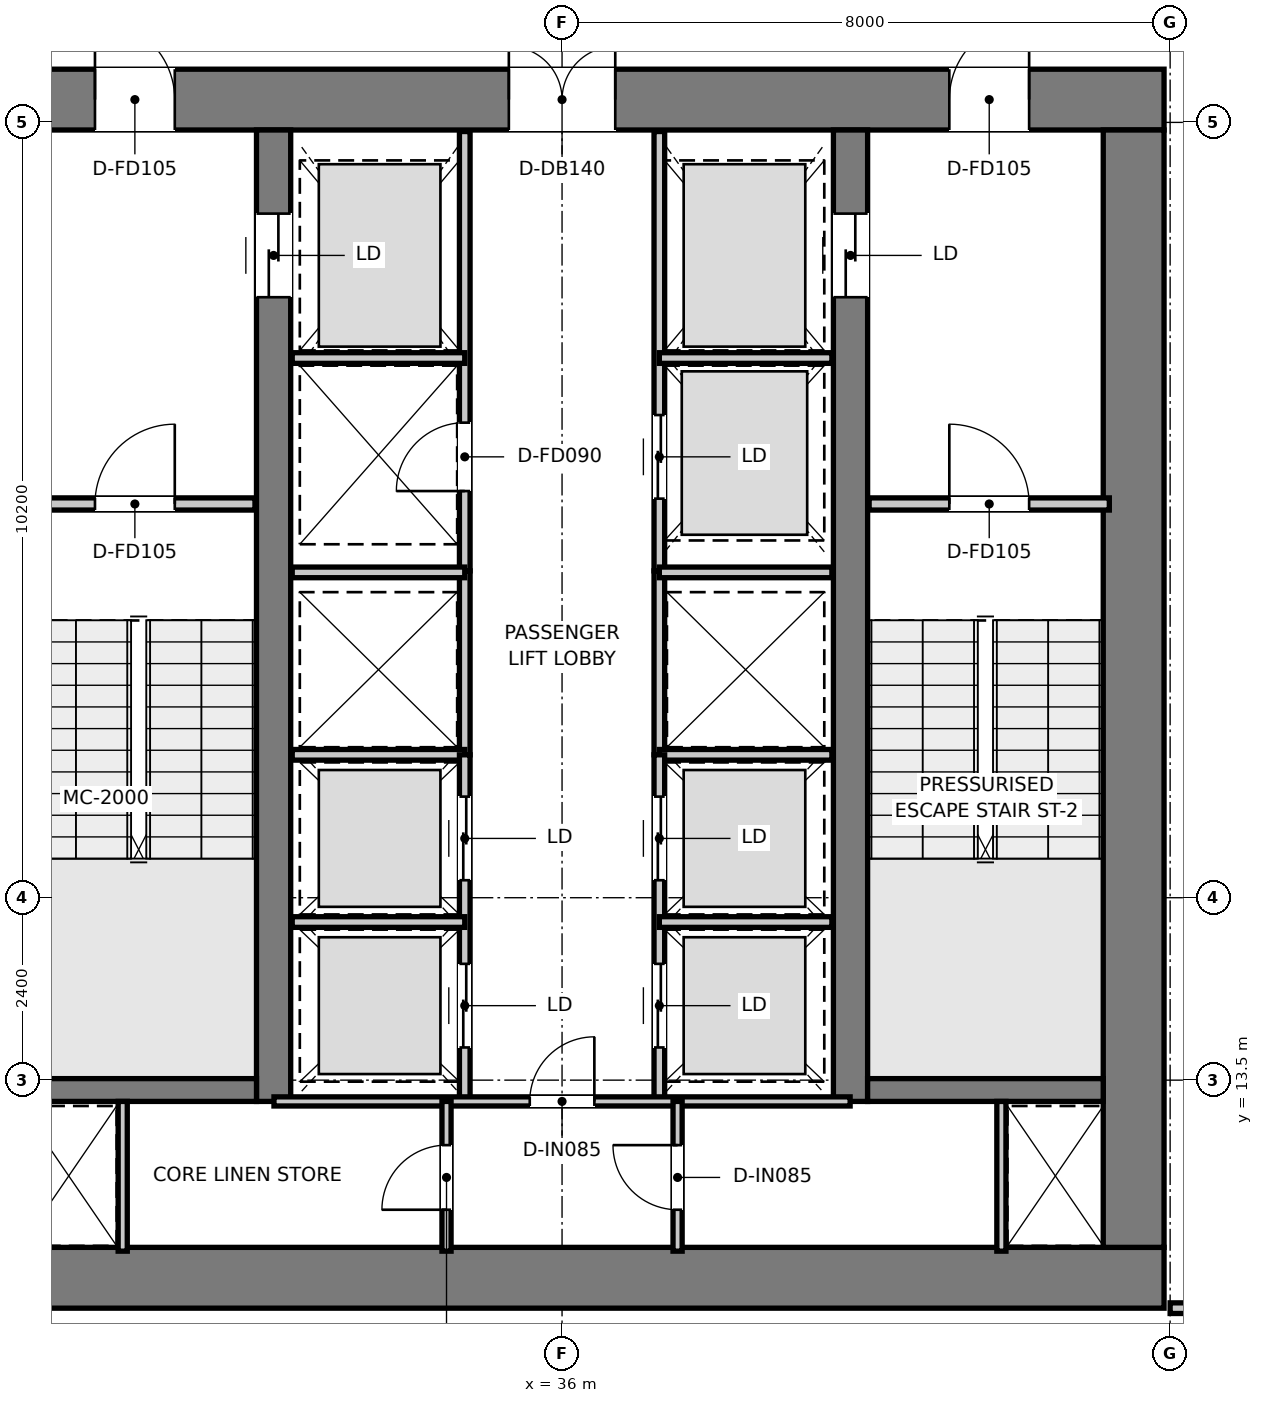
"""IFC4 building model, lengths in metres.
Left out: names, types, materials, properties, quantities, classifications, styles, units other than length and angle.
Written with IfcOpenShell. Run it as: python <this file> out.ifc"""

import sys

from ifc_helpers import new_model, si_unit, direction, frame, frame_2d, origin, place, context, subcontext, project, spatial, rectangle, extrude, element, fill, save


model = new_model("IFC4")
c1 = context("Model", 3, precision=1e-05, world=origin(), true_north=direction((0.0, 1.0)))
c2 = subcontext(c1, "Body", "Model", "MODEL_VIEW")
j1 = project(units=[si_unit("LENGTHUNIT", "METRE"), si_unit("PLANEANGLEUNIT", "RADIAN")], contexts=[c1])
p1 = place(None, origin())
s1 = spatial("IfcSite", under=j1, at=p1, CompositionType="ELEMENT")
p2 = place(p1, origin())
s2 = spatial("IfcBuilding", under=s1, at=p2, CompositionType="ELEMENT")
p3 = place(p2, frame((0.0, 0.0, 137.45)))
s3 = spatial("IfcBuildingStorey", under=s2, at=p3, CompositionType="ELEMENT", Elevation=137.45)
p4 = place(p3, frame((28.08, 10.9, 0.0), z_axis=(0.0, 0.0, 1.0), x_axis=(1.0, 0.0, 0.0)))
e1 = element("IfcWall", 1, at=p4, inside=s3, PredefinedType="SHEAR", context=c2, shape_type="SweptSolid", body=[
    extrude(rectangle(XDim=15.84, YDim=0.8, at=frame_2d((7.92, 0.0))), origin(), (0.0, 0.0, 1.0), 3.95),
])
p5 = place(p3, frame((28.08, 26.4, 0.0), z_axis=(0.0, 0.0, 1.0), x_axis=(1.0, 0.0, 0.0)))
e2 = element("IfcWall", 2, at=p5, inside=s3, PredefinedType="SHEAR", context=c2, shape_type="SweptSolid", body=[
    extrude(rectangle(XDim=15.84, YDim=0.8, at=frame_2d((7.92, 0.0))), origin(), (0.0, 0.0, 1.0), 3.95),
])
p6 = place(p5, frame((7.22, 0.0, 0.0)))
e3 = element("IfcOpeningElement", 3, at=p6, cuts=e2, PredefinedType="OPENING", context=c2, shape_type="SweptSolid", body=[
    extrude(rectangle(XDim=1.4, YDim=2.2, at=frame_2d((0.7, 1.1))), frame((0.0, 0.41, 0.0), z_axis=(0.0, -1.0, 0.0), x_axis=(1.0, 0.0, 0.0)), (0.0, 0.0, 1.0), 0.82),
])
p7 = place(p5, frame((1.775, 0.0, 0.0)))
e4 = element("IfcOpeningElement", 4, at=p7, cuts=e2, PredefinedType="OPENING", context=c2, shape_type="SweptSolid", body=[
    extrude(rectangle(XDim=1.05, YDim=2.1, at=frame_2d((0.525, 1.05))), frame((0.0, 0.41, 0.0), z_axis=(0.0, -1.0, 0.0), x_axis=(1.0, 0.0, 0.0)), (0.0, 0.0, 1.0), 0.82),
])
p8 = place(p5, frame((13.015, 0.0, 0.0)))
e5 = element("IfcOpeningElement", 5, at=p8, cuts=e2, PredefinedType="OPENING", context=c2, shape_type="SweptSolid", body=[
    extrude(rectangle(XDim=1.05, YDim=2.1, at=frame_2d((0.525, 1.05))), frame((0.0, 0.41, 0.0), z_axis=(0.0, -1.0, 0.0), x_axis=(1.0, 0.0, 0.0)), (0.0, 0.0, 1.0), 0.82),
])
p9 = place(p3, frame((43.52, 11.3, 0.0), z_axis=(0.0, 0.0, 1.0), x_axis=(0.0, 1.0, 0.0)))
e6 = element("IfcWall", 6, at=p9, inside=s3, PredefinedType="SHEAR", context=c2, shape_type="SweptSolid", body=[
    extrude(rectangle(XDim=14.7, YDim=0.8, at=frame_2d((7.35, 0.0))), origin(), (0.0, 0.0, 1.0), 3.95),
])
p10 = place(p3, frame((32.205, 13.22, 0.0), z_axis=(0.0, 0.0, 1.0), x_axis=(0.0, 1.0, 0.0)))
e7 = element("IfcWall", 7, at=p10, inside=s3, PredefinedType="SHEAR", context=c2, shape_type="SweptSolid", body=[
    extrude(rectangle(XDim=12.78, YDim=0.45, at=frame_2d((6.39, 0.0))), origin(), (0.0, 0.0, 1.0), 3.95),
])
p11 = place(p10, frame((10.58, 0.0, 0.0)))
e8 = element("IfcOpeningElement", 8, at=p11, cuts=e7, PredefinedType="OPENING", context=c2, shape_type="SweptSolid", body=[
    extrude(rectangle(XDim=1.1, YDim=2.15, at=frame_2d((0.55, 1.075))), frame((0.0, 0.235, 0.0), z_axis=(0.0, -1.0, 0.0), x_axis=(1.0, 0.0, 0.0)), (0.0, 0.0, 1.0), 0.47),
])
p12 = place(p3, frame((39.795, 13.22, 0.0), z_axis=(0.0, 0.0, 1.0), x_axis=(0.0, 1.0, 0.0)))
e9 = element("IfcWall", 9, at=p12, inside=s3, PredefinedType="SHEAR", context=c2, shape_type="SweptSolid", body=[
    extrude(rectangle(XDim=12.78, YDim=0.45, at=frame_2d((6.39, 0.0))), origin(), (0.0, 0.0, 1.0), 3.95),
])
p13 = place(p12, frame((10.58, 0.0, 0.0)))
e10 = element("IfcOpeningElement", 10, at=p13, cuts=e9, PredefinedType="OPENING", context=c2, shape_type="SweptSolid", body=[
    extrude(rectangle(XDim=1.1, YDim=2.15, at=frame_2d((0.55, 1.075))), frame((0.0, 0.235, 0.0), z_axis=(0.0, -1.0, 0.0), x_axis=(1.0, 0.0, 0.0)), (0.0, 0.0, 1.0), 0.47),
])
for number, where, z_axis, x_axis in (
    (11, (28.88, 13.37, 0.0), (0.0, 0.0, 1.0), (1.0, 0.0, 0.0)),
    (12, (40.02, 13.37, 0.0), (0.0, 0.0, 1.0), (1.0, 0.0, 0.0)),
):
    element("IfcWall", number, at=place(p3, frame(where, z_axis=z_axis, x_axis=x_axis)), inside=s3, PredefinedType="SHEAR", context=c2, shape_type="SweptSolid", body=[
        extrude(rectangle(XDim=3.1, YDim=0.3, at=frame_2d((1.55, 0.0))), origin(), (0.0, 0.0, 1.0), 3.95),
    ])
p14 = place(p3, frame((28.8, 21.08, 0.0), z_axis=(0.0, 0.0, 1.0), x_axis=(1.0, 0.0, 0.0)))
e13 = element("IfcWall", 13, at=p14, inside=s3, PredefinedType="PARTITIONING", context=c2, shape_type="SweptSolid", body=[
    extrude(rectangle(XDim=3.16, YDim=0.16, at=frame_2d((1.58, 0.0))), origin(), (0.0, 0.0, 1.0), 3.6),
])
p15 = place(p14, frame((1.055, 0.0, 0.0)))
e14 = element("IfcOpeningElement", 14, at=p15, cuts=e13, PredefinedType="OPENING", context=c2, shape_type="SweptSolid", body=[
    extrude(rectangle(XDim=1.05, YDim=2.1, at=frame_2d((0.525, 1.05))), frame((0.0, 0.09, 0.0), z_axis=(0.0, -1.0, 0.0), x_axis=(1.0, 0.0, 0.0)), (0.0, 0.0, 1.0), 0.18),
])
p16 = place(p3, frame((40.04, 21.08, 0.0), z_axis=(0.0, 0.0, 1.0), x_axis=(1.0, 0.0, 0.0)))
e15 = element("IfcWall", 15, at=p16, inside=s3, PredefinedType="PARTITIONING", context=c2, shape_type="SweptSolid", body=[
    extrude(rectangle(XDim=3.16, YDim=0.16, at=frame_2d((1.58, 0.0))), origin(), (0.0, 0.0, 1.0), 3.6),
])
p17 = place(p16, frame((1.055, 0.0, 0.0)))
e16 = element("IfcOpeningElement", 16, at=p17, cuts=e15, PredefinedType="OPENING", context=c2, shape_type="SweptSolid", body=[
    extrude(rectangle(XDim=1.05, YDim=2.1, at=frame_2d((0.525, 1.05))), frame((0.0, 0.09, 0.0), z_axis=(0.0, -1.0, 0.0), x_axis=(1.0, 0.0, 0.0)), (0.0, 0.0, 1.0), 0.18),
])
p18 = place(p3, frame((34.72, 20.2, 0.0), z_axis=(0.0, 0.0, 1.0), x_axis=(0.0, 1.0, 0.0)))
e17 = element("IfcWall", 17, at=p18, inside=s3, PredefinedType="PARTITIONING", context=c2, shape_type="SweptSolid", body=[
    extrude(rectangle(XDim=5.78, YDim=0.14, at=frame_2d((2.89, 0.0))), origin(), (0.0, 0.0, 1.0), 2.6),
])
p19 = place(p18, frame((1.05, 0.0, 0.0)))
e18 = element("IfcOpeningElement", 18, at=p19, cuts=e17, PredefinedType="OPENING", context=c2, shape_type="SweptSolid", body=[
    extrude(rectangle(XDim=0.9, YDim=2.1, at=frame_2d((0.45, 1.05))), frame((0.0, 0.08, 0.0), z_axis=(0.0, -1.0, 0.0), x_axis=(1.0, 0.0, 0.0)), (0.0, 0.0, 1.0), 0.16),
])
p20 = place(p3, frame((37.28, 20.2, 0.0), z_axis=(0.0, 0.0, 1.0), x_axis=(0.0, 1.0, 0.0)))
e19 = element("IfcWall", 19, at=p20, inside=s3, PredefinedType="PARTITIONING", context=c2, shape_type="SweptSolid", body=[
    extrude(rectangle(XDim=5.78, YDim=0.14, at=frame_2d((2.89, 0.0))), origin(), (0.0, 0.0, 1.0), 2.6),
])
p21 = place(p20, frame((0.95, 0.0, 0.0)))
e20 = element("IfcOpeningElement", 20, at=p21, cuts=e19, PredefinedType="OPENING", context=c2, shape_type="SweptSolid", body=[
    extrude(rectangle(XDim=1.1, YDim=2.15, at=frame_2d((0.55, 1.075))), frame((0.0, 0.08, 0.0), z_axis=(0.0, -1.0, 0.0), x_axis=(1.0, 0.0, 0.0)), (0.0, 0.0, 1.0), 0.16),
])
for number, where, z_axis, x_axis in (
    (21, (32.45, 23.0, 0.0), (0.0, 0.0, 1.0), (1.0, 0.0, 0.0)),
    (22, (37.28, 23.0, 0.0), (0.0, 0.0, 1.0), (1.0, 0.0, 0.0)),
):
    element("IfcWall", number, at=place(p3, frame(where, z_axis=z_axis, x_axis=x_axis)), inside=s3, PredefinedType="PARTITIONING", context=c2, shape_type="SweptSolid", body=[
        extrude(rectangle(XDim=2.27, YDim=0.14, at=frame_2d((1.135, 0.0))), origin(), (0.0, 0.0, 1.0), 2.6),
    ])
for number, where, z_axis, x_axis in (
    (23, (34.72, 17.78, 0.0), (0.0, 0.0, 1.0), (0.0, 1.0, 0.0)),
    (24, (37.28, 17.78, 0.0), (0.0, 0.0, 1.0), (0.0, 1.0, 0.0)),
):
    element("IfcWall", number, at=place(p3, frame(where, z_axis=z_axis, x_axis=x_axis)), inside=s3, PredefinedType="PARTITIONING", context=c2, shape_type="SweptSolid", body=[
        extrude(rectangle(XDim=2.42, YDim=0.14, at=frame_2d((1.21, 0.0))), origin(), (0.0, 0.0, 1.0), 3.6),
    ])
for number, where, z_axis, x_axis in (
    (25, (32.45, 17.78, 0.0), (0.0, 0.0, 1.0), (1.0, 0.0, 0.0)),
    (26, (32.45, 20.18, 0.0), (0.0, 0.0, 1.0), (1.0, 0.0, 0.0)),
    (27, (37.28, 17.78, 0.0), (0.0, 0.0, 1.0), (1.0, 0.0, 0.0)),
    (28, (37.28, 20.18, 0.0), (0.0, 0.0, 1.0), (1.0, 0.0, 0.0)),
):
    element("IfcWall", number, at=place(p3, frame(where, z_axis=z_axis, x_axis=x_axis)), inside=s3, PredefinedType="PARTITIONING", context=c2, shape_type="SweptSolid", body=[
        extrude(rectangle(XDim=2.27, YDim=0.14, at=frame_2d((1.135, 0.0))), origin(), (0.0, 0.0, 1.0), 3.6),
    ])
p22 = place(p3, frame((34.72, 13.22, 0.0), z_axis=(0.0, 0.0, 1.0), x_axis=(0.0, 1.0, 0.0)))
e29 = element("IfcWall", 29, at=p22, inside=s3, PredefinedType="PARTITIONING", context=c2, shape_type="SweptSolid", body=[
    extrude(rectangle(XDim=4.56, YDim=0.14, at=frame_2d((2.28, 0.0))), origin(), (0.0, 0.0, 1.0), 3.6),
])
p23 = place(p22, frame((0.71, 0.0, 0.0)))
e30 = element("IfcOpeningElement", 30, at=p23, cuts=e29, PredefinedType="OPENING", context=c2, shape_type="SweptSolid", body=[
    extrude(rectangle(XDim=1.1, YDim=2.15, at=frame_2d((0.55, 1.075))), frame((0.0, 0.08, 0.0), z_axis=(0.0, -1.0, 0.0), x_axis=(1.0, 0.0, 0.0)), (0.0, 0.0, 1.0), 0.16),
])
p24 = place(p22, frame((2.91, 0.0, 0.0)))
e31 = element("IfcOpeningElement", 31, at=p24, cuts=e29, PredefinedType="OPENING", context=c2, shape_type="SweptSolid", body=[
    extrude(rectangle(XDim=1.1, YDim=2.15, at=frame_2d((0.55, 1.075))), frame((0.0, 0.08, 0.0), z_axis=(0.0, -1.0, 0.0), x_axis=(1.0, 0.0, 0.0)), (0.0, 0.0, 1.0), 0.16),
])
p25 = place(p3, frame((32.45, 15.58, 0.0), z_axis=(0.0, 0.0, 1.0), x_axis=(1.0, 0.0, 0.0)))
e32 = element("IfcWall", 32, at=p25, inside=s3, PredefinedType="PARTITIONING", context=c2, shape_type="SweptSolid", body=[
    extrude(rectangle(XDim=2.27, YDim=0.14, at=frame_2d((1.135, 0.0))), origin(), (0.0, 0.0, 1.0), 3.6),
])
p26 = place(p3, frame((37.28, 13.22, 0.0), z_axis=(0.0, 0.0, 1.0), x_axis=(0.0, 1.0, 0.0)))
e33 = element("IfcWall", 33, at=p26, inside=s3, PredefinedType="PARTITIONING", context=c2, shape_type="SweptSolid", body=[
    extrude(rectangle(XDim=4.56, YDim=0.14, at=frame_2d((2.28, 0.0))), origin(), (0.0, 0.0, 1.0), 3.6),
])
p27 = place(p26, frame((0.71, 0.0, 0.0)))
e34 = element("IfcOpeningElement", 34, at=p27, cuts=e33, PredefinedType="OPENING", context=c2, shape_type="SweptSolid", body=[
    extrude(rectangle(XDim=1.1, YDim=2.15, at=frame_2d((0.55, 1.075))), frame((0.0, 0.08, 0.0), z_axis=(0.0, -1.0, 0.0), x_axis=(1.0, 0.0, 0.0)), (0.0, 0.0, 1.0), 0.16),
])
p28 = place(p26, frame((2.91, 0.0, 0.0)))
e35 = element("IfcOpeningElement", 35, at=p28, cuts=e33, PredefinedType="OPENING", context=c2, shape_type="SweptSolid", body=[
    extrude(rectangle(XDim=1.1, YDim=2.15, at=frame_2d((0.55, 1.075))), frame((0.0, 0.08, 0.0), z_axis=(0.0, -1.0, 0.0), x_axis=(1.0, 0.0, 0.0)), (0.0, 0.0, 1.0), 0.16),
])
p29 = place(p3, frame((37.28, 15.58, 0.0), z_axis=(0.0, 0.0, 1.0), x_axis=(1.0, 0.0, 0.0)))
e36 = element("IfcWall", 36, at=p29, inside=s3, PredefinedType="PARTITIONING", context=c2, shape_type="SweptSolid", body=[
    extrude(rectangle(XDim=2.27, YDim=0.14, at=frame_2d((1.135, 0.0))), origin(), (0.0, 0.0, 1.0), 3.6),
])
for number, where, z_axis, x_axis in (
    (37, (30.22, 11.25, 0.0), (0.0, 0.0, 1.0), (0.0, 1.0, 0.0)),
    (38, (41.78, 11.25, 0.0), (0.0, 0.0, 1.0), (0.0, 1.0, 0.0)),
):
    element("IfcWall", number, at=place(p3, frame(where, z_axis=z_axis, x_axis=x_axis)), inside=s3, PredefinedType="PARTITIONING", context=c2, shape_type="SweptSolid", body=[
        extrude(rectangle(XDim=1.97, YDim=0.12, at=frame_2d((0.985, 0.0))), origin(), (0.0, 0.0, 1.0), 3.6),
    ])
p30 = place(p3, frame((32.21, 13.22, 0.0), z_axis=(0.0, 0.0, 1.0), x_axis=(1.0, 0.0, 0.0)))
e39 = element("IfcWall", 39, at=p30, inside=s3, PredefinedType="PARTITIONING", context=c2, shape_type="SweptSolid", body=[
    extrude(rectangle(XDim=7.58, YDim=0.12, at=frame_2d((3.79, 0.0))), origin(), (0.0, 0.0, 1.0), 3.6),
])
p31 = place(p30, frame((3.365, 0.0, 0.0)))
e40 = element("IfcOpeningElement", 40, at=p31, cuts=e39, PredefinedType="OPENING", context=c2, shape_type="SweptSolid", body=[
    extrude(rectangle(XDim=0.85, YDim=2.1, at=frame_2d((0.425, 1.05))), frame((0.0, 0.07, 0.0), z_axis=(0.0, -1.0, 0.0), x_axis=(1.0, 0.0, 0.0)), (0.0, 0.0, 1.0), 0.14),
])
p32 = place(p3, frame((34.48, 11.25, 0.0), z_axis=(0.0, 0.0, 1.0), x_axis=(0.0, 1.0, 0.0)))
e41 = element("IfcWall", 41, at=p32, inside=s3, PredefinedType="PARTITIONING", context=c2, shape_type="SweptSolid", body=[
    extrude(rectangle(XDim=1.97, YDim=0.12, at=frame_2d((0.985, 0.0))), origin(), (0.0, 0.0, 1.0), 3.6),
])
p33 = place(p32, frame((0.545, 0.0, 0.0)))
e42 = element("IfcOpeningElement", 42, at=p33, cuts=e41, PredefinedType="OPENING", context=c2, shape_type="SweptSolid", body=[
    extrude(rectangle(XDim=0.85, YDim=2.1, at=frame_2d((0.425, 1.05))), frame((0.0, 0.07, 0.0), z_axis=(0.0, -1.0, 0.0), x_axis=(1.0, 0.0, 0.0)), (0.0, 0.0, 1.0), 0.14),
])
p34 = place(p3, frame((37.52, 11.25, 0.0), z_axis=(0.0, 0.0, 1.0), x_axis=(0.0, 1.0, 0.0)))
e43 = element("IfcWall", 43, at=p34, inside=s3, PredefinedType="PARTITIONING", context=c2, shape_type="SweptSolid", body=[
    extrude(rectangle(XDim=1.97, YDim=0.12, at=frame_2d((0.985, 0.0))), origin(), (0.0, 0.0, 1.0), 3.6),
])
p35 = place(p34, frame((0.545, 0.0, 0.0)))
e44 = element("IfcOpeningElement", 44, at=p35, cuts=e43, PredefinedType="OPENING", context=c2, shape_type="SweptSolid", body=[
    extrude(rectangle(XDim=0.85, YDim=2.1, at=frame_2d((0.425, 1.05))), frame((0.0, 0.07, 0.0), z_axis=(0.0, -1.0, 0.0), x_axis=(1.0, 0.0, 0.0)), (0.0, 0.0, 1.0), 0.14),
])
p36 = place(p3, frame((44.0, 10.5, 0.0), z_axis=(0.0, 0.0, 1.0), x_axis=(1.0, 0.0, 0.0)))
e45 = element("IfcWall", 45, at=p36, inside=s3, PredefinedType="PARTITIONING", context=c2, shape_type="SweptSolid", body=[
    extrude(rectangle(XDim=1.68, YDim=0.14, at=frame_2d((0.84, 0.0))), origin(), (0.0, 0.0, 1.0), 3.6),
])
p37 = place(p15, origin())
e46 = element("IfcDoor", 46, at=p37, inside=s3, OperationType="SINGLE_SWING_RIGHT", PredefinedType="DOOR", context=c2, shape_type="SweptSolid", body=[
    extrude(rectangle(XDim=1.05, YDim=2.1, at=frame_2d((0.525, 1.05))), frame((0.0, 0.025, 0.0), z_axis=(0.0, -1.0, 0.0), x_axis=(1.0, 0.0, 0.0)), (0.0, 0.0, 1.0), 0.05),
])
fill(e14, e46)
p38 = place(p17, origin())
e47 = element("IfcDoor", 47, at=p38, inside=s3, OperationType="SINGLE_SWING_LEFT", PredefinedType="DOOR", context=c2, shape_type="SweptSolid", body=[
    extrude(rectangle(XDim=1.05, YDim=2.1, at=frame_2d((0.525, 1.05))), frame((0.0, 0.025, 0.0), z_axis=(0.0, -1.0, 0.0), x_axis=(1.0, 0.0, 0.0)), (0.0, 0.0, 1.0), 0.05),
])
fill(e16, e47)
p39 = place(p6, origin())
e48 = element("IfcDoor", 48, at=p39, inside=s3, OperationType="DOUBLE_DOOR_SINGLE_SWING", PredefinedType="DOOR", context=c2, shape_type="SweptSolid", body=[
    extrude(rectangle(XDim=1.4, YDim=2.2, at=frame_2d((0.7, 1.1))), frame((0.0, 0.025, 0.0), z_axis=(0.0, -1.0, 0.0), x_axis=(1.0, 0.0, 0.0)), (0.0, 0.0, 1.0), 0.05),
])
fill(e3, e48)
p40 = place(p7, origin())
e49 = element("IfcDoor", 49, at=p40, inside=s3, OperationType="SINGLE_SWING_LEFT", PredefinedType="DOOR", context=c2, shape_type="SweptSolid", body=[
    extrude(rectangle(XDim=1.05, YDim=2.1, at=frame_2d((0.525, 1.05))), frame((0.0, 0.025, 0.0), z_axis=(0.0, -1.0, 0.0), x_axis=(1.0, 0.0, 0.0)), (0.0, 0.0, 1.0), 0.05),
])
fill(e4, e49)
p41 = place(p8, origin())
e50 = element("IfcDoor", 50, at=p41, inside=s3, OperationType="SINGLE_SWING_RIGHT", PredefinedType="DOOR", context=c2, shape_type="SweptSolid", body=[
    extrude(rectangle(XDim=1.05, YDim=2.1, at=frame_2d((0.525, 1.05))), frame((0.0, 0.025, 0.0), z_axis=(0.0, -1.0, 0.0), x_axis=(1.0, 0.0, 0.0)), (0.0, 0.0, 1.0), 0.05),
])
fill(e5, e50)
p42 = place(p11, origin())
e51 = element("IfcDoor", 51, at=p42, inside=s3, OperationType="DOUBLE_DOOR_SLIDING", PredefinedType="DOOR", context=c2, shape_type="SweptSolid", body=[
    extrude(rectangle(XDim=1.1, YDim=2.15, at=frame_2d((0.55, 1.075))), frame((0.0, 0.025, 0.0), z_axis=(0.0, -1.0, 0.0), x_axis=(1.0, 0.0, 0.0)), (0.0, 0.0, 1.0), 0.05),
])
fill(e8, e51)
p43 = place(p13, origin())
e52 = element("IfcDoor", 52, at=p43, inside=s3, OperationType="DOUBLE_DOOR_SLIDING", PredefinedType="DOOR", context=c2, shape_type="SweptSolid", body=[
    extrude(rectangle(XDim=1.1, YDim=2.15, at=frame_2d((0.55, 1.075))), frame((0.0, 0.025, 0.0), z_axis=(0.0, -1.0, 0.0), x_axis=(1.0, 0.0, 0.0)), (0.0, 0.0, 1.0), 0.05),
])
fill(e10, e52)
p44 = place(p19, origin())
e53 = element("IfcDoor", 53, at=p44, inside=s3, OperationType="SINGLE_SWING_LEFT", PredefinedType="DOOR", context=c2, shape_type="SweptSolid", body=[
    extrude(rectangle(XDim=0.9, YDim=2.1, at=frame_2d((0.45, 1.05))), frame((0.0, 0.025, 0.0), z_axis=(0.0, -1.0, 0.0), x_axis=(1.0, 0.0, 0.0)), (0.0, 0.0, 1.0), 0.05),
])
fill(e18, e53)
p45 = place(p21, origin())
e54 = element("IfcDoor", 54, at=p45, inside=s3, OperationType="DOUBLE_DOOR_SLIDING", PredefinedType="DOOR", context=c2, shape_type="SweptSolid", body=[
    extrude(rectangle(XDim=1.1, YDim=2.15, at=frame_2d((0.55, 1.075))), frame((0.0, 0.025, 0.0), z_axis=(0.0, -1.0, 0.0), x_axis=(1.0, 0.0, 0.0)), (0.0, 0.0, 1.0), 0.05),
])
fill(e20, e54)
p46 = place(p23, origin())
e55 = element("IfcDoor", 55, at=p46, inside=s3, OperationType="DOUBLE_DOOR_SLIDING", PredefinedType="DOOR", context=c2, shape_type="SweptSolid", body=[
    extrude(rectangle(XDim=1.1, YDim=2.15, at=frame_2d((0.55, 1.075))), frame((0.0, 0.025, 0.0), z_axis=(0.0, -1.0, 0.0), x_axis=(1.0, 0.0, 0.0)), (0.0, 0.0, 1.0), 0.05),
])
fill(e30, e55)
p47 = place(p24, origin())
e56 = element("IfcDoor", 56, at=p47, inside=s3, OperationType="DOUBLE_DOOR_SLIDING", PredefinedType="DOOR", context=c2, shape_type="SweptSolid", body=[
    extrude(rectangle(XDim=1.1, YDim=2.15, at=frame_2d((0.55, 1.075))), frame((0.0, 0.025, 0.0), z_axis=(0.0, -1.0, 0.0), x_axis=(1.0, 0.0, 0.0)), (0.0, 0.0, 1.0), 0.05),
])
fill(e31, e56)
p48 = place(p27, origin())
e57 = element("IfcDoor", 57, at=p48, inside=s3, OperationType="DOUBLE_DOOR_SLIDING", PredefinedType="DOOR", context=c2, shape_type="SweptSolid", body=[
    extrude(rectangle(XDim=1.1, YDim=2.15, at=frame_2d((0.55, 1.075))), frame((0.0, 0.025, 0.0), z_axis=(0.0, -1.0, 0.0), x_axis=(1.0, 0.0, 0.0)), (0.0, 0.0, 1.0), 0.05),
])
fill(e34, e57)
p49 = place(p28, origin())
e58 = element("IfcDoor", 58, at=p49, inside=s3, OperationType="DOUBLE_DOOR_SLIDING", PredefinedType="DOOR", context=c2, shape_type="SweptSolid", body=[
    extrude(rectangle(XDim=1.1, YDim=2.15, at=frame_2d((0.55, 1.075))), frame((0.0, 0.025, 0.0), z_axis=(0.0, -1.0, 0.0), x_axis=(1.0, 0.0, 0.0)), (0.0, 0.0, 1.0), 0.05),
])
fill(e35, e58)
p50 = place(p31, origin())
e59 = element("IfcDoor", 59, at=p50, inside=s3, OperationType="SINGLE_SWING_RIGHT", PredefinedType="DOOR", context=c2, shape_type="SweptSolid", body=[
    extrude(rectangle(XDim=0.85, YDim=2.1, at=frame_2d((0.425, 1.05))), frame((0.0, 0.025, 0.0), z_axis=(0.0, -1.0, 0.0), x_axis=(1.0, 0.0, 0.0)), (0.0, 0.0, 1.0), 0.05),
])
fill(e40, e59)
p51 = place(p33, origin())
e60 = element("IfcDoor", 60, at=p51, inside=s3, OperationType="SINGLE_SWING_LEFT", PredefinedType="DOOR", context=c2, shape_type="SweptSolid", body=[
    extrude(rectangle(XDim=0.85, YDim=2.1, at=frame_2d((0.425, 1.05))), frame((0.0, 0.025, 0.0), z_axis=(0.0, -1.0, 0.0), x_axis=(1.0, 0.0, 0.0)), (0.0, 0.0, 1.0), 0.05),
])
fill(e42, e60)
p52 = place(p35, origin())
e61 = element("IfcDoor", 61, at=p52, inside=s3, OperationType="SINGLE_SWING_RIGHT", PredefinedType="DOOR", context=c2, shape_type="SweptSolid", body=[
    extrude(rectangle(XDim=0.85, YDim=2.1, at=frame_2d((0.425, 1.05))), frame((0.0, 0.025, 0.0), z_axis=(0.0, -1.0, 0.0), x_axis=(1.0, 0.0, 0.0)), (0.0, 0.0, 1.0), 0.05),
])
fill(e44, e61)
save(model, sys.argv[1])
